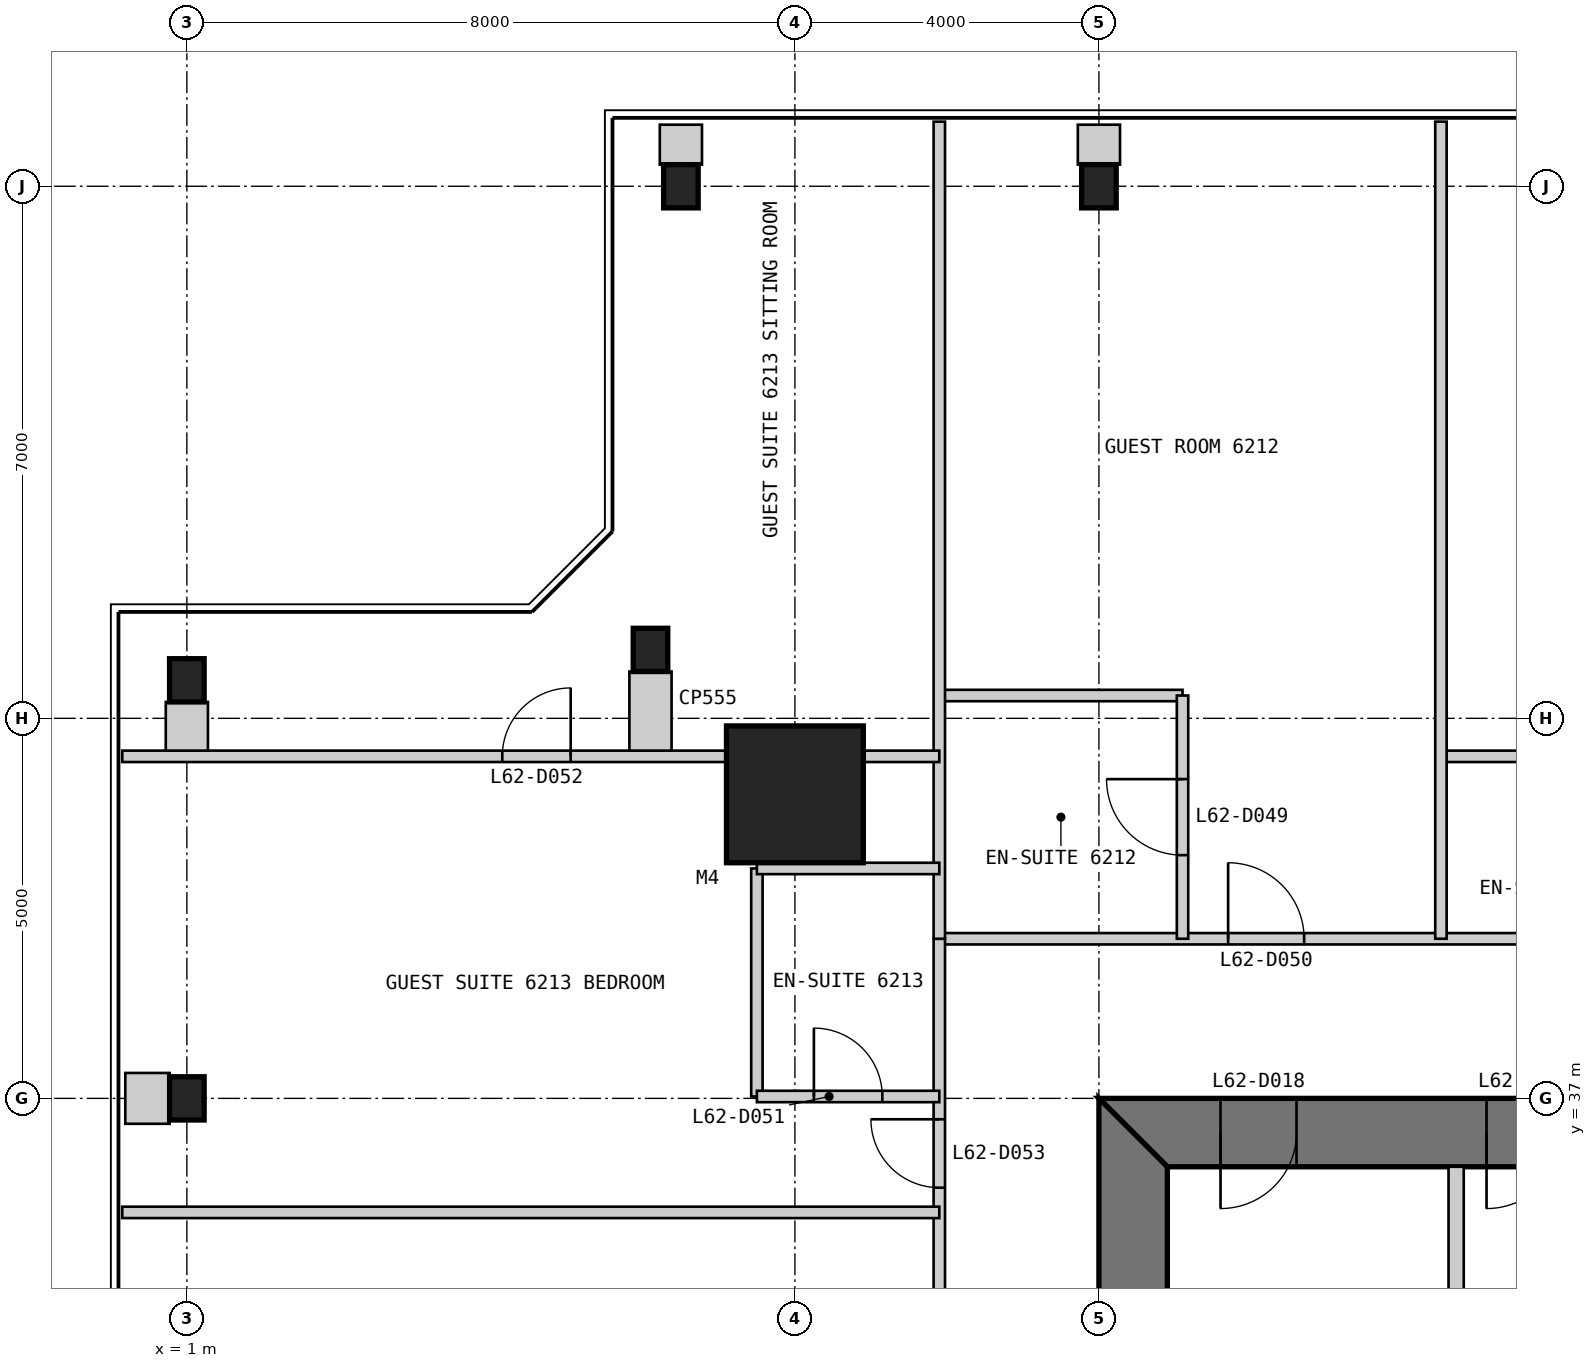
"""IFC4 building model, lengths in metres.
Left out: names, types, materials, properties, quantities, classifications, styles, units other than length and angle.
Written with IfcOpenShell. Run it as: python <this file> out.ifc"""

import sys

from ifc_helpers import new_model, si_unit, direction, frame, frame_2d, origin, origin_2d, place, context, subcontext, project, spatial, polyline, rectangle, i_section, outline, extrude, element, fill, save


model = new_model("IFC4")
c1 = context("Model", 3, precision=1e-05, world=origin(), true_north=direction((0.0, 1.0)))
c2 = subcontext(c1, "Body", "Model", "MODEL_VIEW")
j1 = project(units=[si_unit("LENGTHUNIT", "METRE"), si_unit("PLANEANGLEUNIT", "RADIAN")], contexts=[c1])
p1 = place(None, origin())
s1 = spatial("IfcSite", under=j1, at=p1, CompositionType="ELEMENT")
p2 = place(p1, origin())
s2 = spatial("IfcBuilding", under=s1, at=p2, CompositionType="ELEMENT")
p3 = place(p2, frame((0.0, 0.0, 262.8)))
s3 = spatial("IfcBuildingStorey", under=s2, at=p3, CompositionType="ELEMENT", Elevation=262.8)
p4 = place(p3, frame((9.0, 41.0, 0.0), z_axis=(0.0, 0.0, 1.0), x_axis=(1.0, 0.0, 0.0)))
e1 = element("IfcColumn", 1, at=p4, inside=s3, PredefinedType="COLUMN", context=c2, shape_type="SweptSolid", body=[
    extrude(rectangle(XDim=1.8, YDim=1.8, at=origin_2d()), origin(), (0.0, 0.0, 1.0), 3.4),
])
for number, where, z_axis, x_axis in (
    (2, (13.0, 49.0, 0.0), (0.0, 0.0, 1.0), (1.0, 0.0, 0.0)),
    (3, (7.5, 49.0, 0.0), (0.0, 0.0, 1.0), (1.0, 0.0, 0.0)),
    (4, (7.1, 42.9, 0.0), (0.0, 0.0, 1.0), (1.0, 0.0, 0.0)),
    (5, (1.0, 42.5, 0.0), (0.0, 0.0, 1.0), (1.0, 0.0, 0.0)),
    (6, (1.0, 37.0, 0.0), (0.0, 0.0, 1.0), (1.0, 0.0, 0.0)),
):
    element("IfcColumn", number, at=place(p3, frame(where, z_axis=z_axis, x_axis=x_axis)), inside=s3, PredefinedType="COLUMN", context=c2, shape_type="SweptSolid", body=[
        extrude(i_section(OverallWidth=0.455, OverallDepth=0.569, WebThickness=0.078, FlangeThickness=0.125, at=origin_2d()), origin(), (0.0, 0.0, 1.0), 3.4),
    ])
p5 = place(p3, frame((37.0, 36.55, 0.0), z_axis=(0.0, 0.0, 1.0), x_axis=(-1.0, 0.0, 0.0)))
e7 = element("IfcWall", 7, at=p5, inside=s3, PredefinedType="SHEAR", context=c2, shape_type="SweptSolid", body=[
    extrude(outline(polyline([(0.0, -0.45), (24.0, -0.45), (23.1, 0.45), (0.9, 0.45), (0.0, -0.45)])), origin(), (0.0, 0.0, 1.0), 3.4),
])
p6 = place(p5, frame((4.9, 0.0, 0.0)))
e8 = element("IfcOpeningElement", 8, at=p6, cuts=e7, PredefinedType="OPENING", context=c2, shape_type="SweptSolid", body=[
    extrude(rectangle(XDim=1.0, YDim=2.2, at=frame_2d((0.5, 1.1))), frame((0.0, 0.46, 0.0), z_axis=(0.0, -1.0, 0.0), x_axis=(1.0, 0.0, 0.0)), (0.0, 0.0, 1.0), 0.92),
])
p7 = place(p5, frame((8.9, 0.0, 0.0)))
e9 = element("IfcOpeningElement", 9, at=p7, cuts=e7, PredefinedType="OPENING", context=c2, shape_type="SweptSolid", body=[
    extrude(rectangle(XDim=1.1, YDim=2.2, at=frame_2d((0.55, 1.1))), frame((0.0, 0.46, 0.0), z_axis=(0.0, -1.0, 0.0), x_axis=(1.0, 0.0, 0.0)), (0.0, 0.0, 1.0), 0.92),
])
p8 = place(p5, frame((15.05, 0.0, 0.0)))
e10 = element("IfcOpeningElement", 10, at=p8, cuts=e7, PredefinedType="OPENING", context=c2, shape_type="SweptSolid", body=[
    extrude(rectangle(XDim=0.9, YDim=2.2, at=frame_2d((0.45, 1.1))), frame((0.0, 0.46, 0.0), z_axis=(0.0, -1.0, 0.0), x_axis=(1.0, 0.0, 0.0)), (0.0, 0.0, 1.0), 0.92),
])
p9 = place(p5, frame((17.9, 0.0, 0.0)))
e11 = element("IfcOpeningElement", 11, at=p9, cuts=e7, PredefinedType="OPENING", context=c2, shape_type="SweptSolid", body=[
    extrude(rectangle(XDim=1.0, YDim=2.2, at=frame_2d((0.5, 1.1))), frame((0.0, 0.46, 0.0), z_axis=(0.0, -1.0, 0.0), x_axis=(1.0, 0.0, 0.0)), (0.0, 0.0, 1.0), 0.92),
])
p10 = place(p5, frame((21.4, 0.0, 0.0)))
e12 = element("IfcOpeningElement", 12, at=p10, cuts=e7, PredefinedType="OPENING", context=c2, shape_type="SweptSolid", body=[
    extrude(rectangle(XDim=1.0, YDim=2.2, at=frame_2d((0.5, 1.1))), frame((0.0, 0.46, 0.0), z_axis=(0.0, -1.0, 0.0), x_axis=(1.0, 0.0, 0.0)), (0.0, 0.0, 1.0), 0.92),
])
p11 = place(p3, frame((13.45, 36.1, 0.0), z_axis=(0.0, 0.0, 1.0), x_axis=(0.0, -1.0, 0.0)))
e13 = element("IfcWall", 13, at=p11, inside=s3, PredefinedType="SHEAR", context=c2, shape_type="SweptSolid", body=[
    extrude(outline(polyline([(-0.9, -0.45), (23.1, -0.45), (22.2, 0.45), (0.0, 0.45), (-0.9, -0.45)])), origin(), (0.0, 0.0, 1.0), 3.4),
])
p12 = place(p11, frame((20.2, 0.0, 0.0)))
e14 = element("IfcOpeningElement", 14, at=p12, cuts=e13, PredefinedType="OPENING", context=c2, shape_type="SweptSolid", body=[
    extrude(rectangle(XDim=1.0, YDim=2.2, at=frame_2d((0.5, 1.1))), frame((0.0, 0.46, 0.0), z_axis=(0.0, -1.0, 0.0), x_axis=(1.0, 0.0, 0.0)), (0.0, 0.0, 1.0), 0.92),
])
p13 = place(p11, frame((17.25, 0.0, 0.0)))
e15 = element("IfcOpeningElement", 15, at=p13, cuts=e13, PredefinedType="OPENING", context=c2, shape_type="SweptSolid", body=[
    extrude(rectangle(XDim=0.9, YDim=2.2, at=frame_2d((0.45, 1.1))), frame((0.0, 0.46, 0.0), z_axis=(0.0, -1.0, 0.0), x_axis=(1.0, 0.0, 0.0)), (0.0, 0.0, 1.0), 0.92),
])
p14 = place(p3, frame((17.7, 36.1, 0.0), z_axis=(0.0, 0.0, 1.0), x_axis=(0.0, -1.0, 0.0)))
e16 = element("IfcWall", 16, at=p14, inside=s3, PredefinedType="PARTITIONING", context=c2, shape_type="SweptSolid", body=[
    extrude(rectangle(XDim=6.1, YDim=0.2, at=frame_2d((3.05, 0.0))), origin(), (0.0, 0.0, 1.0), 3.2),
])
p15 = place(p3, frame((39.1, 39.1, 0.0), z_axis=(0.0, 0.0, 1.0), x_axis=(-1.0, 0.0, 0.0)))
e17 = element("IfcWall", 17, at=p15, inside=s3, PredefinedType="PARTITIONING", context=c2, shape_type="SweptSolid", body=[
    extrude(rectangle(XDim=28.2, YDim=0.15, at=frame_2d((14.1, 0.0))), origin(), (0.0, 0.0, 1.0), 3.25),
])
p16 = place(p15, frame((2.375, 0.0, 0.0)))
e18 = element("IfcOpeningElement", 18, at=p16, cuts=e17, PredefinedType="OPENING", context=c2, shape_type="SweptSolid", body=[
    extrude(rectangle(XDim=0.9, YDim=2.1, at=frame_2d((0.45, 1.05))), frame((0.0, 0.085, 0.0), z_axis=(0.0, -1.0, 0.0), x_axis=(1.0, 0.0, 0.0)), (0.0, 0.0, 1.0), 0.17),
])
p17 = place(p15, frame((10.7, 0.0, 0.0)))
e19 = element("IfcOpeningElement", 19, at=p17, cuts=e17, PredefinedType="OPENING", context=c2, shape_type="SweptSolid", body=[
    extrude(rectangle(XDim=0.9, YDim=2.1, at=frame_2d((0.45, 1.05))), frame((0.0, 0.085, 0.0), z_axis=(0.0, -1.0, 0.0), x_axis=(1.0, 0.0, 0.0)), (0.0, 0.0, 1.0), 0.17),
])
p18 = place(p15, frame((17.1, 0.0, 0.0)))
e20 = element("IfcOpeningElement", 20, at=p18, cuts=e17, PredefinedType="OPENING", context=c2, shape_type="SweptSolid", body=[
    extrude(rectangle(XDim=0.9, YDim=2.1, at=frame_2d((0.45, 1.05))), frame((0.0, 0.085, 0.0), z_axis=(0.0, -1.0, 0.0), x_axis=(1.0, 0.0, 0.0)), (0.0, 0.0, 1.0), 0.17),
])
p19 = place(p15, frame((23.4, 0.0, 0.0)))
e21 = element("IfcOpeningElement", 21, at=p19, cuts=e17, PredefinedType="OPENING", context=c2, shape_type="SweptSolid", body=[
    extrude(rectangle(XDim=1.0, YDim=2.1, at=frame_2d((0.5, 1.05))), frame((0.0, 0.085, 0.0), z_axis=(0.0, -1.0, 0.0), x_axis=(1.0, 0.0, 0.0)), (0.0, 0.0, 1.0), 0.17),
])
p20 = place(p3, frame((20.5, 41.5, 0.0), z_axis=(0.0, 0.0, 1.0), x_axis=(-1.0, 0.0, 0.0)))
e22 = element("IfcWall", 22, at=p20, inside=s3, PredefinedType="PARTITIONING", context=c2, shape_type="SweptSolid", body=[
    extrude(rectangle(XDim=3.0, YDim=0.15, at=frame_2d((1.5, 0.0))), origin(), (0.0, 0.0, 1.0), 3.25),
])
p21 = place(p3, frame((17.5, 49.85, 0.0), z_axis=(0.0, 0.0, 1.0), x_axis=(0.0, -1.0, 0.0)))
e23 = element("IfcWall", 23, at=p21, inside=s3, PredefinedType="PARTITIONING", context=c2, shape_type="SweptSolid", body=[
    extrude(rectangle(XDim=10.75, YDim=0.15, at=frame_2d((5.375, 0.0))), origin(), (0.0, 0.0, 1.0), 3.25),
])
p22 = place(p3, frame((14.1, 42.3, 0.0), z_axis=(0.0, 0.0, 1.0), x_axis=(-1.0, 0.0, 0.0)))
e24 = element("IfcWall", 24, at=p22, inside=s3, PredefinedType="PARTITIONING", context=c2, shape_type="SweptSolid", body=[
    extrude(rectangle(XDim=3.2, YDim=0.15, at=frame_2d((1.6, 0.0))), origin(), (0.0, 0.0, 1.0), 3.25),
])
p23 = place(p3, frame((14.1, 42.3, 0.0), z_axis=(0.0, 0.0, 1.0), x_axis=(0.0, -1.0, 0.0)))
e25 = element("IfcWall", 25, at=p23, inside=s3, PredefinedType="PARTITIONING", context=c2, shape_type="SweptSolid", body=[
    extrude(rectangle(XDim=3.2, YDim=0.15, at=frame_2d((1.6, 0.0))), origin(), (0.0, 0.0, 1.0), 3.25),
])
p24 = place(p23, frame((1.1, 0.0, 0.0)))
e26 = element("IfcOpeningElement", 26, at=p24, cuts=e25, PredefinedType="OPENING", context=c2, shape_type="SweptSolid", body=[
    extrude(rectangle(XDim=1.0, YDim=2.1, at=frame_2d((0.5, 1.05))), frame((0.0, 0.085, 0.0), z_axis=(0.0, -1.0, 0.0), x_axis=(1.0, 0.0, 0.0)), (0.0, 0.0, 1.0), 0.17),
])
p25 = place(p3, frame((10.9, 39.1, 0.0), z_axis=(0.0, 0.0, 1.0), x_axis=(0.0, -1.0, 0.0)))
e27 = element("IfcWall", 27, at=p25, inside=s3, PredefinedType="PARTITIONING", context=c2, shape_type="SweptSolid", body=[
    extrude(rectangle(XDim=28.2, YDim=0.15, at=frame_2d((14.1, 0.0))), origin(), (0.0, 0.0, 1.0), 3.25),
])
p26 = place(p25, frame((2.375, 0.0, 0.0)))
e28 = element("IfcOpeningElement", 28, at=p26, cuts=e27, PredefinedType="OPENING", context=c2, shape_type="SweptSolid", body=[
    extrude(rectangle(XDim=0.9, YDim=2.1, at=frame_2d((0.45, 1.05))), frame((0.0, 0.085, 0.0), z_axis=(0.0, -1.0, 0.0), x_axis=(1.0, 0.0, 0.0)), (0.0, 0.0, 1.0), 0.17),
])
p27 = place(p25, frame((10.7, 0.0, 0.0)))
e29 = element("IfcOpeningElement", 29, at=p27, cuts=e27, PredefinedType="OPENING", context=c2, shape_type="SweptSolid", body=[
    extrude(rectangle(XDim=0.9, YDim=2.1, at=frame_2d((0.45, 1.05))), frame((0.0, 0.085, 0.0), z_axis=(0.0, -1.0, 0.0), x_axis=(1.0, 0.0, 0.0)), (0.0, 0.0, 1.0), 0.17),
])
p28 = place(p25, frame((17.1, 0.0, 0.0)))
e30 = element("IfcOpeningElement", 30, at=p28, cuts=e27, PredefinedType="OPENING", context=c2, shape_type="SweptSolid", body=[
    extrude(rectangle(XDim=0.9, YDim=2.1, at=frame_2d((0.45, 1.05))), frame((0.0, 0.085, 0.0), z_axis=(0.0, -1.0, 0.0), x_axis=(1.0, 0.0, 0.0)), (0.0, 0.0, 1.0), 0.17),
])
p29 = place(p25, frame((23.7, 0.0, 0.0)))
e31 = element("IfcOpeningElement", 31, at=p29, cuts=e27, PredefinedType="OPENING", context=c2, shape_type="SweptSolid", body=[
    extrude(rectangle(XDim=0.9, YDim=2.1, at=frame_2d((0.45, 1.05))), frame((0.0, 0.085, 0.0), z_axis=(0.0, -1.0, 0.0), x_axis=(1.0, 0.0, 0.0)), (0.0, 0.0, 1.0), 0.17),
])
p30 = place(p3, frame((10.9, 49.85, 0.0), z_axis=(0.0, 0.0, 1.0), x_axis=(0.0, -1.0, 0.0)))
e32 = element("IfcWall", 32, at=p30, inside=s3, PredefinedType="PARTITIONING", context=c2, shape_type="SweptSolid", body=[
    extrude(rectangle(XDim=10.75, YDim=0.15, at=frame_2d((5.375, 0.0))), origin(), (0.0, 0.0, 1.0), 3.25),
])
p31 = place(p3, frame((8.5, 40.025, 0.0), z_axis=(0.0, 0.0, 1.0), x_axis=(0.0, -1.0, 0.0)))
e33 = element("IfcWall", 33, at=p31, inside=s3, PredefinedType="PARTITIONING", context=c2, shape_type="SweptSolid", body=[
    extrude(rectangle(XDim=3.0, YDim=0.15, at=frame_2d((1.5, 0.0))), origin(), (0.0, 0.0, 1.0), 3.25),
])
p32 = place(p3, frame((8.5, 37.025, 0.0), z_axis=(0.0, 0.0, 1.0), x_axis=(1.0, 0.0, 0.0)))
e34 = element("IfcWall", 34, at=p32, inside=s3, PredefinedType="PARTITIONING", context=c2, shape_type="SweptSolid", body=[
    extrude(rectangle(XDim=2.4, YDim=0.15, at=frame_2d((1.2, 0.0))), origin(), (0.0, 0.0, 1.0), 2.404),
])
p33 = place(p32, frame((0.75, 0.0, 0.0)))
e35 = element("IfcOpeningElement", 35, at=p33, cuts=e34, PredefinedType="OPENING", context=c2, shape_type="SweptSolid", body=[
    extrude(rectangle(XDim=0.9, YDim=2.1, at=frame_2d((0.45, 1.05))), frame((0.0, 0.085, 0.0), z_axis=(0.0, -1.0, 0.0), x_axis=(1.0, 0.0, 0.0)), (0.0, 0.0, 1.0), 0.17),
])
p34 = place(p3, frame((8.5, 40.025, 0.0), z_axis=(0.0, 0.0, 1.0), x_axis=(1.0, 0.0, 0.0)))
e36 = element("IfcWall", 36, at=p34, inside=s3, PredefinedType="PARTITIONING", context=c2, shape_type="SweptSolid", body=[
    extrude(rectangle(XDim=2.4, YDim=0.15, at=frame_2d((1.2, 0.0))), origin(), (0.0, 0.0, 1.0), 3.25),
])
p35 = place(p3, frame((0.15, 41.5, 0.0), z_axis=(0.0, 0.0, 1.0), x_axis=(1.0, 0.0, 0.0)))
e37 = element("IfcWall", 37, at=p35, inside=s3, PredefinedType="PARTITIONING", context=c2, shape_type="SweptSolid", body=[
    extrude(rectangle(XDim=10.75, YDim=0.15, at=frame_2d((5.375, 0.0))), origin(), (0.0, 0.0, 1.0), 3.25),
])
p36 = place(p35, frame((5.0, 0.0, 0.0)))
e38 = element("IfcOpeningElement", 38, at=p36, cuts=e37, PredefinedType="OPENING", context=c2, shape_type="SweptSolid", body=[
    extrude(rectangle(XDim=0.9, YDim=2.1, at=frame_2d((0.45, 1.05))), frame((0.0, 0.085, 0.0), z_axis=(0.0, -1.0, 0.0), x_axis=(1.0, 0.0, 0.0)), (0.0, 0.0, 1.0), 0.17),
])
p37 = place(p3, frame((0.15, 35.5, 0.0), z_axis=(0.0, 0.0, 1.0), x_axis=(1.0, 0.0, 0.0)))
e39 = element("IfcWall", 39, at=p37, inside=s3, PredefinedType="PARTITIONING", context=c2, shape_type="SweptSolid", body=[
    extrude(rectangle(XDim=10.75, YDim=0.15, at=frame_2d((5.375, 0.0))), origin(), (0.0, 0.0, 1.0), 3.25),
])
for number, where, z_axis, x_axis in (
    (40, (13.0, 49.81, 0.0), (0.0, 0.0, 1.0), (0.0, -1.0, 0.0)),
    (41, (7.5, 49.81, 0.0), (0.0, 0.0, 1.0), (0.0, -1.0, 0.0)),
):
    element("IfcWall", number, at=place(p3, frame(where, z_axis=z_axis, x_axis=x_axis)), inside=s3, PredefinedType="PARTITIONING", context=c2, shape_type="SweptSolid", body=[
        extrude(rectangle(XDim=0.526, YDim=0.555, at=frame_2d((0.263, 0.0))), origin(), (0.0, 0.0, 1.0), 3.25),
    ])
p38 = place(p3, frame((7.1, 41.575, 0.0), z_axis=(0.0, 0.0, 1.0), x_axis=(0.0, 1.0, 0.0)))
e42 = element("IfcWall", 42, at=p38, inside=s3, PredefinedType="PARTITIONING", context=c2, shape_type="SweptSolid", body=[
    extrude(rectangle(XDim=1.041, YDim=0.555, at=frame_2d((0.52, 0.0))), origin(), (0.0, 0.0, 1.0), 3.25),
])
p39 = place(p3, frame((1.0, 41.575, 0.0), z_axis=(0.0, 0.0, 1.0), x_axis=(0.0, 1.0, 0.0)))
e43 = element("IfcWall", 43, at=p39, inside=s3, PredefinedType="PARTITIONING", context=c2, shape_type="SweptSolid", body=[
    extrude(rectangle(XDim=0.641, YDim=0.555, at=frame_2d((0.32, 0.0))), origin(), (0.0, 0.0, 1.0), 2.338),
])
p40 = place(p3, frame((0.19, 37.0, 0.0), z_axis=(0.0, 0.0, 1.0), x_axis=(1.0, 0.0, 0.0)))
e44 = element("IfcWall", 44, at=p40, inside=s3, PredefinedType="PARTITIONING", context=c2, shape_type="SweptSolid", body=[
    extrude(rectangle(XDim=0.583, YDim=0.669, at=frame_2d((0.292, 0.0))), origin(), (0.0, 0.0, 1.0), 3.25),
])
p41 = place(p9, origin())
e45 = element("IfcDoor", 45, at=p41, inside=s3, OperationType="SINGLE_SWING_RIGHT", PredefinedType="DOOR", context=c2, shape_type="SweptSolid", body=[
    extrude(rectangle(XDim=1.0, YDim=2.2, at=frame_2d((0.5, 1.1))), frame((0.0, 0.025, 0.0), z_axis=(0.0, -1.0, 0.0), x_axis=(1.0, 0.0, 0.0)), (0.0, 0.0, 1.0), 0.05),
    extrude(outline(polyline([(0.0, 0.0), (0.04, 0.0), (0.04, 2.16), (0.96, 2.16), (0.96, 0.0), (1.0, 0.0), (1.0, 2.2), (0.0, 2.2), (0.0, 0.0)])), frame((0.0, 0.3, 0.0), z_axis=(0.0, -1.0, 0.0), x_axis=(1.0, 0.0, 0.0)), (0.0, 0.0, 1.0), 0.6),
])
fill(e11, e45)
p42 = place(p10, origin())
e46 = element("IfcDoor", 46, at=p42, inside=s3, OperationType="SINGLE_SWING_RIGHT", PredefinedType="DOOR", context=c2, shape_type="SweptSolid", body=[
    extrude(rectangle(XDim=1.0, YDim=2.2, at=frame_2d((0.5, 1.1))), frame((0.0, 0.025, 0.0), z_axis=(0.0, -1.0, 0.0), x_axis=(1.0, 0.0, 0.0)), (0.0, 0.0, 1.0), 0.05),
    extrude(outline(polyline([(0.0, 0.0), (0.04, 0.0), (0.04, 2.16), (0.96, 2.16), (0.96, 0.0), (1.0, 0.0), (1.0, 2.2), (0.0, 2.2), (0.0, 0.0)])), frame((0.0, 0.3, 0.0), z_axis=(0.0, -1.0, 0.0), x_axis=(1.0, 0.0, 0.0)), (0.0, 0.0, 1.0), 0.6),
])
fill(e12, e46)
p43 = place(p24, frame((1.0, 0.0, 0.0), z_axis=(0.0, 0.0, 1.0), x_axis=(-1.0, 0.0, 0.0)))
e47 = element("IfcDoor", 47, at=p43, inside=s3, OperationType="SINGLE_SWING_RIGHT", PredefinedType="DOOR", context=c2, shape_type="SweptSolid", body=[
    extrude(rectangle(XDim=1.0, YDim=2.1, at=frame_2d((0.5, 1.05))), frame((0.0, 0.025, 0.0), z_axis=(0.0, -1.0, 0.0), x_axis=(1.0, 0.0, 0.0)), (0.0, 0.0, 1.0), 0.05),
])
fill(e26, e47)
p44 = place(p19, frame((1.0, 0.0, 0.0), z_axis=(0.0, 0.0, 1.0), x_axis=(-1.0, 0.0, 0.0)))
e48 = element("IfcDoor", 48, at=p44, inside=s3, OperationType="SINGLE_SWING_LEFT", PredefinedType="DOOR", context=c2, shape_type="SweptSolid", body=[
    extrude(rectangle(XDim=1.0, YDim=2.1, at=frame_2d((0.5, 1.05))), frame((0.0, 0.025, 0.0), z_axis=(0.0, -1.0, 0.0), x_axis=(1.0, 0.0, 0.0)), (0.0, 0.0, 1.0), 0.05),
])
fill(e21, e48)
p45 = place(p33, origin())
e49 = element("IfcDoor", 49, at=p45, inside=s3, OperationType="SINGLE_SWING_LEFT", PredefinedType="DOOR", context=c2, shape_type="SweptSolid", body=[
    extrude(rectangle(XDim=0.9, YDim=2.1, at=frame_2d((0.45, 1.05))), frame((0.0, 0.025, 0.0), z_axis=(0.0, -1.0, 0.0), x_axis=(1.0, 0.0, 0.0)), (0.0, 0.0, 1.0), 0.05),
])
fill(e35, e49)
p46 = place(p36, origin())
e50 = element("IfcDoor", 50, at=p46, inside=s3, OperationType="SINGLE_SWING_RIGHT", PredefinedType="DOOR", context=c2, shape_type="SweptSolid", body=[
    extrude(rectangle(XDim=0.9, YDim=2.1, at=frame_2d((0.45, 1.05))), frame((0.0, 0.025, 0.0), z_axis=(0.0, -1.0, 0.0), x_axis=(1.0, 0.0, 0.0)), (0.0, 0.0, 1.0), 0.05),
])
fill(e38, e50)
p47 = place(p26, frame((0.9, 0.0, 0.0), z_axis=(0.0, 0.0, 1.0), x_axis=(-1.0, 0.0, 0.0)))
e51 = element("IfcDoor", 51, at=p47, inside=s3, OperationType="SINGLE_SWING_RIGHT", PredefinedType="DOOR", context=c2, shape_type="SweptSolid", body=[
    extrude(rectangle(XDim=0.9, YDim=2.1, at=frame_2d((0.45, 1.05))), frame((0.0, 0.025, 0.0), z_axis=(0.0, -1.0, 0.0), x_axis=(1.0, 0.0, 0.0)), (0.0, 0.0, 1.0), 0.05),
])
fill(e28, e51)
save(model, sys.argv[1])
